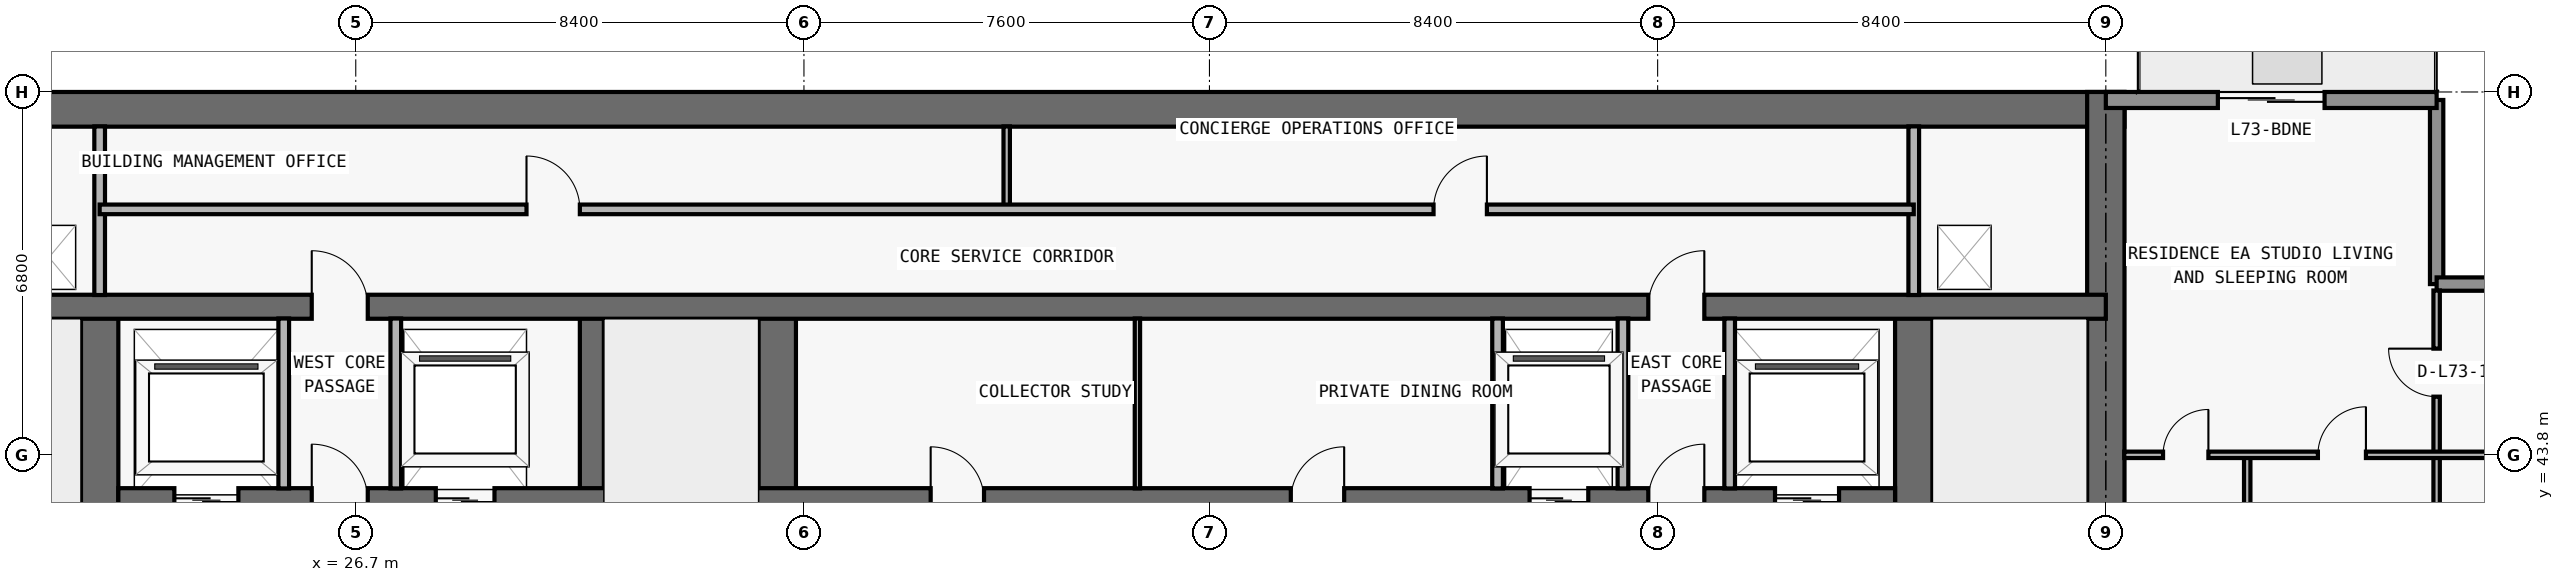
"""IFC4 building model, lengths in metres.
Left out: names, types, materials, properties, quantities, classifications, styles, units other than length and angle.
Written with IfcOpenShell. Run it as: python <this file> out.ifc"""

import sys

from ifc_helpers import new_model, si_unit, direction, frame, frame_2d, origin, place, context, subcontext, project, spatial, rectangle, extrude, element, fill, save


model = new_model("IFC4")
c1 = context("Model", 3, precision=1e-05, world=origin(), true_north=direction((0.0, 1.0)))
c2 = subcontext(c1, "Body", "Model", "MODEL_VIEW")
j1 = project(units=[si_unit("LENGTHUNIT", "METRE"), si_unit("PLANEANGLEUNIT", "RADIAN")], contexts=[c1])
p1 = place(None, origin())
s1 = spatial("IfcSite", under=j1, at=p1, CompositionType="ELEMENT")
p2 = place(p1, origin())
s2 = spatial("IfcBuilding", under=s1, at=p2, CompositionType="ELEMENT")
p3 = place(p2, frame((0.0, 0.0, 259.5)))
s3 = spatial("IfcBuildingStorey", under=s2, at=p3, CompositionType="ELEMENT", Elevation=259.5)
p4 = place(p3, frame((17.95, 50.275, 0.0), z_axis=(0.0, 0.0, 1.0), x_axis=(1.0, 0.0, 0.0)))
e1 = element("IfcWall", 1, at=p4, inside=s3, PredefinedType="SHEAR", context=c2, shape_type="SweptSolid", body=[
    extrude(rectangle(XDim=41.9, YDim=0.65, at=frame_2d((20.95, 0.0))), origin(), (0.0, 0.0, 1.0), 3.05),
])
p5 = place(p3, frame((59.5, 36.65, 0.0), z_axis=(0.0, 0.0, 1.0), x_axis=(0.0, 1.0, 0.0)))
e2 = element("IfcWall", 2, at=p5, inside=s3, PredefinedType="SHEAR", context=c2, shape_type="SweptSolid", body=[
    extrude(rectangle(XDim=13.95, YDim=0.7, at=frame_2d((6.975, 0.0))), origin(), (0.0, 0.0, 1.0), 3.05),
])
p6 = place(p3, frame((21.9, 37.0, 0.0), z_axis=(0.0, 0.0, 1.0), x_axis=(0.0, 1.0, 0.0)))
e3 = element("IfcWall", 3, at=p6, inside=s3, PredefinedType="SHEAR", context=c2, shape_type="SweptSolid", body=[
    extrude(rectangle(XDim=9.575, YDim=0.7, at=frame_2d((4.788, 0.0))), origin(), (0.0, 0.0, 1.0), 3.05),
])
p7 = place(p6, frame((0.55, 0.0, 0.0)))
e4 = element("IfcOpeningElement", 4, at=p7, cuts=e3, PredefinedType="OPENING", context=c2, shape_type="SweptSolid", body=[
    extrude(rectangle(XDim=1.1, YDim=2.15, at=frame_2d((0.55, 1.075))), frame((0.0, 0.36, 0.0), z_axis=(0.0, -1.0, 0.0), x_axis=(1.0, 0.0, 0.0)), (0.0, 0.0, 1.0), 0.72),
])
p8 = place(p3, frame((55.9, 37.0, 0.0), z_axis=(0.0, 0.0, 1.0), x_axis=(0.0, 1.0, 0.0)))
e5 = element("IfcWall", 5, at=p8, inside=s3, PredefinedType="SHEAR", context=c2, shape_type="SweptSolid", body=[
    extrude(rectangle(XDim=9.575, YDim=0.7, at=frame_2d((4.788, 0.0))), origin(), (0.0, 0.0, 1.0), 3.05),
])
p9 = place(p8, frame((0.55, 0.0, 0.0)))
e6 = element("IfcOpeningElement", 6, at=p9, cuts=e5, PredefinedType="OPENING", context=c2, shape_type="SweptSolid", body=[
    extrude(rectangle(XDim=1.1, YDim=2.15, at=frame_2d((0.55, 1.075))), frame((0.0, 0.36, 0.0), z_axis=(0.0, -1.0, 0.0), x_axis=(1.0, 0.0, 0.0)), (0.0, 0.0, 1.0), 0.72),
])
p10 = place(p3, frame((31.125, 37.0, 0.0), z_axis=(0.0, 0.0, 1.0), x_axis=(0.0, 1.0, 0.0)))
e7 = element("IfcWall", 7, at=p10, inside=s3, PredefinedType="SHEAR", context=c2, shape_type="SweptSolid", body=[
    extrude(rectangle(XDim=9.575, YDim=0.45, at=frame_2d((4.788, 0.0))), origin(), (0.0, 0.0, 1.0), 3.05),
])
p11 = place(p3, frame((34.6, 37.0, 0.0), z_axis=(0.0, 0.0, 1.0), x_axis=(0.0, 1.0, 0.0)))
e8 = element("IfcWall", 8, at=p11, inside=s3, PredefinedType="SHEAR", context=c2, shape_type="SweptSolid", body=[
    extrude(rectangle(XDim=9.575, YDim=0.7, at=frame_2d((4.788, 0.0))), origin(), (0.0, 0.0, 1.0), 3.05),
])
p12 = place(p3, frame((22.25, 42.95, 0.0), z_axis=(0.0, 0.0, 1.0), x_axis=(1.0, 0.0, 0.0)))
e9 = element("IfcWall", 9, at=p12, inside=s3, PredefinedType="SHEAR", context=c2, shape_type="SweptSolid", body=[
    extrude(rectangle(XDim=33.3, YDim=0.45, at=frame_2d((16.65, 0.0))), origin(), (0.0, 0.0, 1.0), 3.05),
])
p13 = place(p12, frame((1.05, 0.0, 0.0)))
e10 = element("IfcOpeningElement", 10, at=p13, cuts=e9, PredefinedType="OPENING", context=c2, shape_type="SweptSolid", body=[
    extrude(rectangle(XDim=1.2, YDim=2.2, at=frame_2d((0.6, 1.1))), frame((0.0, 0.235, 0.0), z_axis=(0.0, -1.0, 0.0), x_axis=(1.0, 0.0, 0.0)), (0.0, 0.0, 1.0), 0.47),
])
p14 = place(p12, frame((31.05, 0.0, 0.0)))
e11 = element("IfcOpeningElement", 11, at=p14, cuts=e9, PredefinedType="OPENING", context=c2, shape_type="SweptSolid", body=[
    extrude(rectangle(XDim=1.2, YDim=2.2, at=frame_2d((0.6, 1.1))), frame((0.0, 0.235, 0.0), z_axis=(0.0, -1.0, 0.0), x_axis=(1.0, 0.0, 0.0)), (0.0, 0.0, 1.0), 0.47),
])
p15 = place(p12, frame((26.45, 0.0, 0.0)))
e12 = element("IfcOpeningElement", 12, at=p15, cuts=e9, PredefinedType="OPENING", context=c2, shape_type="SweptSolid", body=[
    extrude(rectangle(XDim=1.1, YDim=2.2, at=frame_2d((0.55, 1.1))), frame((0.0, 0.235, 0.0), z_axis=(0.0, -1.0, 0.0), x_axis=(1.0, 0.0, 0.0)), (0.0, 0.0, 1.0), 0.47),
])
p16 = place(p12, frame((5.95, 0.0, 0.0)))
e13 = element("IfcOpeningElement", 13, at=p16, cuts=e9, PredefinedType="OPENING", context=c2, shape_type="SweptSolid", body=[
    extrude(rectangle(XDim=1.1, YDim=2.2, at=frame_2d((0.55, 1.1))), frame((0.0, 0.235, 0.0), z_axis=(0.0, -1.0, 0.0), x_axis=(1.0, 0.0, 0.0)), (0.0, 0.0, 1.0), 0.47),
])
p17 = place(p12, frame((3.625, 0.0, 0.0)))
e14 = element("IfcOpeningElement", 14, at=p17, cuts=e9, PredefinedType="OPENING", context=c2, shape_type="SweptSolid", body=[
    extrude(rectangle(XDim=1.05, YDim=2.15, at=frame_2d((0.525, 1.075))), frame((0.0, 0.235, 0.0), z_axis=(0.0, -1.0, 0.0), x_axis=(1.0, 0.0, 0.0)), (0.0, 0.0, 1.0), 0.47),
])
p18 = place(p12, frame((28.675, 0.0, 0.0)))
e15 = element("IfcOpeningElement", 15, at=p18, cuts=e9, PredefinedType="OPENING", context=c2, shape_type="SweptSolid", body=[
    extrude(rectangle(XDim=1.05, YDim=2.15, at=frame_2d((0.525, 1.075))), frame((0.0, 0.235, 0.0), z_axis=(0.0, -1.0, 0.0), x_axis=(1.0, 0.0, 0.0)), (0.0, 0.0, 1.0), 0.47),
])
p19 = place(p12, frame((15.225, 0.0, 0.0)))
e16 = element("IfcOpeningElement", 16, at=p19, cuts=e9, PredefinedType="OPENING", context=c2, shape_type="SweptSolid", body=[
    extrude(rectangle(XDim=1.0, YDim=2.2, at=frame_2d((0.5, 1.1))), frame((0.0, 0.235, 0.0), z_axis=(0.0, -1.0, 0.0), x_axis=(1.0, 0.0, 0.0)), (0.0, 0.0, 1.0), 0.47),
])
p20 = place(p12, frame((21.975, 0.0, 0.0)))
e17 = element("IfcOpeningElement", 17, at=p20, cuts=e9, PredefinedType="OPENING", context=c2, shape_type="SweptSolid", body=[
    extrude(rectangle(XDim=1.0, YDim=2.2, at=frame_2d((0.5, 1.1))), frame((0.0, 0.235, 0.0), z_axis=(0.0, -1.0, 0.0), x_axis=(1.0, 0.0, 0.0)), (0.0, 0.0, 1.0), 0.47),
])
p21 = place(p3, frame((18.3, 46.575, 0.0), z_axis=(0.0, 0.0, 1.0), x_axis=(1.0, 0.0, 0.0)))
e18 = element("IfcWall", 18, at=p21, inside=s3, PredefinedType="SHEAR", context=c2, shape_type="SweptSolid", body=[
    extrude(rectangle(XDim=41.2, YDim=0.45, at=frame_2d((20.6, 0.0))), origin(), (0.0, 0.0, 1.0), 3.05),
])
p22 = place(p21, frame((7.575, 0.0, 0.0)))
e19 = element("IfcOpeningElement", 19, at=p22, cuts=e18, PredefinedType="OPENING", context=c2, shape_type="SweptSolid", body=[
    extrude(rectangle(XDim=1.05, YDim=2.15, at=frame_2d((0.525, 1.075))), frame((0.0, 0.235, 0.0), z_axis=(0.0, -1.0, 0.0), x_axis=(1.0, 0.0, 0.0)), (0.0, 0.0, 1.0), 0.47),
])
p23 = place(p21, frame((32.625, 0.0, 0.0)))
e20 = element("IfcOpeningElement", 20, at=p23, cuts=e18, PredefinedType="OPENING", context=c2, shape_type="SweptSolid", body=[
    extrude(rectangle(XDim=1.05, YDim=2.15, at=frame_2d((0.525, 1.075))), frame((0.0, 0.235, 0.0), z_axis=(0.0, -1.0, 0.0), x_axis=(1.0, 0.0, 0.0)), (0.0, 0.0, 1.0), 0.47),
])
p24 = place(p3, frame((65.7, 50.45, 0.0), z_axis=(0.0, 0.0, 1.0), x_axis=(0.0, -1.0, 0.0)))
e21 = element("IfcWall", 21, at=p24, inside=s3, PredefinedType="ELEMENTEDWALL", context=c2, shape_type="SweptSolid", body=[
    extrude(rectangle(XDim=3.45, YDim=0.25, at=frame_2d((1.725, 0.0))), origin(), (0.0, 0.0, 1.0), 3.05),
])
p25 = place(p3, frame((65.7, 47.0, 0.0), z_axis=(0.0, 0.0, 1.0), x_axis=(1.0, 0.0, 0.0)))
e22 = element("IfcWall", 22, at=p25, inside=s3, PredefinedType="ELEMENTEDWALL", context=c2, shape_type="SweptSolid", body=[
    extrude(rectangle(XDim=3.85, YDim=0.25, at=frame_2d((1.925, 0.0))), origin(), (0.0, 0.0, 1.0), 3.05),
])
p26 = place(p3, frame((59.5, 50.45, 0.0), z_axis=(0.0, 0.0, 1.0), x_axis=(1.0, 0.0, 0.0)))
e23 = element("IfcWall", 23, at=p26, inside=s3, PredefinedType="STANDARD", context=c2, shape_type="SweptSolid", body=[
    extrude(rectangle(XDim=6.2, YDim=0.3, at=frame_2d((3.1, 0.0))), origin(), (0.0, 0.0, 1.0), 3.05),
])
p27 = place(p26, frame((2.1, 0.0, 0.0)))
e24 = element("IfcOpeningElement", 24, at=p27, cuts=e23, PredefinedType="OPENING", context=c2, shape_type="SweptSolid", body=[
    extrude(rectangle(XDim=2.0, YDim=2.3, at=frame_2d((1.0, 1.15))), frame((0.0, 0.16, 0.0), z_axis=(0.0, -1.0, 0.0), x_axis=(1.0, 0.0, 0.0)), (0.0, 0.0, 1.0), 0.32),
])
p28 = place(p3, frame((21.9, 46.795, 0.0), z_axis=(0.0, 0.0, 1.0), x_axis=(0.0, 1.0, 0.0)))
e25 = element("IfcWall", 25, at=p28, inside=s3, PredefinedType="PARTITIONING", context=c2, shape_type="SweptSolid", body=[
    extrude(rectangle(XDim=3.16, YDim=0.2, at=frame_2d((1.58, 0.0))), origin(), (0.0, 0.0, 1.0), 3.05),
])
for number, where, z_axis, x_axis in (
    (26, (25.35, 43.17, 0.0), (0.0, 0.0, 1.0), (0.0, 1.0, 0.0)),
    (27, (27.45, 43.17, 0.0), (0.0, 0.0, 1.0), (0.0, 1.0, 0.0)),
):
    element("IfcWall", number, at=place(p3, frame(where, z_axis=z_axis, x_axis=x_axis)), inside=s3, PredefinedType="PARTITIONING", context=c2, shape_type="SweptSolid", body=[
        extrude(rectangle(XDim=3.185, YDim=0.2, at=frame_2d((1.593, 0.0))), origin(), (0.0, 0.0, 1.0), 3.05),
    ])
p29 = place(p3, frame((38.9, 48.4, 0.0), z_axis=(0.0, 0.0, 1.0), x_axis=(0.0, 1.0, 0.0)))
e28 = element("IfcWall", 28, at=p29, inside=s3, PredefinedType="PARTITIONING", context=c2, shape_type="SweptSolid", body=[
    extrude(rectangle(XDim=1.555, YDim=0.12, at=frame_2d((0.778, 0.0))), origin(), (0.0, 0.0, 1.0), 3.05),
])
p30 = place(p3, frame((41.35, 43.17, 0.0), z_axis=(0.0, 0.0, 1.0), x_axis=(0.0, 1.0, 0.0)))
e29 = element("IfcWall", 29, at=p30, inside=s3, PredefinedType="MOVABLE", context=c2, shape_type="SweptSolid", body=[
    extrude(rectangle(XDim=3.185, YDim=0.1, at=frame_2d((1.593, 0.0))), origin(), (0.0, 0.0, 1.0), 3.05),
])
for number, where, z_axis, x_axis in (
    (30, (48.1, 43.17, 0.0), (0.0, 0.0, 1.0), (0.0, 1.0, 0.0)),
    (31, (50.45, 43.17, 0.0), (0.0, 0.0, 1.0), (0.0, 1.0, 0.0)),
    (32, (52.45, 43.17, 0.0), (0.0, 0.0, 1.0), (0.0, 1.0, 0.0)),
):
    element("IfcWall", number, at=place(p3, frame(where, z_axis=z_axis, x_axis=x_axis)), inside=s3, PredefinedType="PARTITIONING", context=c2, shape_type="SweptSolid", body=[
        extrude(rectangle(XDim=3.185, YDim=0.2, at=frame_2d((1.593, 0.0))), origin(), (0.0, 0.0, 1.0), 3.05),
    ])
p31 = place(p3, frame((55.9, 46.795, 0.0), z_axis=(0.0, 0.0, 1.0), x_axis=(0.0, 1.0, 0.0)))
e33 = element("IfcWall", 33, at=p31, inside=s3, PredefinedType="PARTITIONING", context=c2, shape_type="SweptSolid", body=[
    extrude(rectangle(XDim=3.16, YDim=0.2, at=frame_2d((1.58, 0.0))), origin(), (0.0, 0.0, 1.0), 3.05),
])
p32 = place(p3, frame((62.15, 37.0, 0.0), z_axis=(0.0, 0.0, 1.0), x_axis=(0.0, 1.0, 0.0)))
e34 = element("IfcWall", 34, at=p32, inside=s3, PredefinedType="PARTITIONING", context=c2, shape_type="SweptSolid", body=[
    extrude(rectangle(XDim=6.8, YDim=0.12, at=frame_2d((3.4, 0.0))), origin(), (0.0, 0.0, 1.0), 3.05),
])
p33 = place(p32, frame((1.207, 0.0, 0.0)))
e35 = element("IfcOpeningElement", 35, at=p33, cuts=e34, PredefinedType="OPENING", context=c2, shape_type="SweptSolid", body=[
    extrude(rectangle(XDim=0.85, YDim=2.1, at=frame_2d((0.425, 1.05))), frame((0.0, 0.07, 0.0), z_axis=(0.0, -1.0, 0.0), x_axis=(1.0, 0.0, 0.0)), (0.0, 0.0, 1.0), 0.14),
])
p34 = place(p3, frame((65.7, 37.005, 0.0), z_axis=(0.0, 0.0, 1.0), x_axis=(0.0, 1.0, 0.0)))
e36 = element("IfcWall", 36, at=p34, inside=s3, PredefinedType="PARTITIONING", context=c2, shape_type="SweptSolid", body=[
    extrude(rectangle(XDim=9.875, YDim=0.12, at=frame_2d((4.938, 0.0))), origin(), (0.0, 0.0, 1.0), 2.629),
])
p35 = place(p34, frame((2.948, 0.0, 0.0)))
e37 = element("IfcOpeningElement", 37, at=p35, cuts=e36, PredefinedType="OPENING", context=c2, shape_type="SweptSolid", body=[
    extrude(rectangle(XDim=0.9, YDim=2.15, at=frame_2d((0.45, 1.075))), frame((0.0, 0.07, 0.0), z_axis=(0.0, -1.0, 0.0), x_axis=(1.0, 0.0, 0.0)), (0.0, 0.0, 1.0), 0.14),
])
p36 = place(p34, frame((7.885, 0.0, 0.0)))
e38 = element("IfcOpeningElement", 38, at=p36, cuts=e36, PredefinedType="OPENING", context=c2, shape_type="SweptSolid", body=[
    extrude(rectangle(XDim=0.9, YDim=2.15, at=frame_2d((0.45, 1.075))), frame((0.0, 0.07, 0.0), z_axis=(0.0, -1.0, 0.0), x_axis=(1.0, 0.0, 0.0)), (0.0, 0.0, 1.0), 0.14),
])
p37 = place(p3, frame((59.845, 43.8, 0.0), z_axis=(0.0, 0.0, 1.0), x_axis=(1.0, 0.0, 0.0)))
e39 = element("IfcWall", 39, at=p37, inside=s3, PredefinedType="PARTITIONING", context=c2, shape_type="SweptSolid", body=[
    extrude(rectangle(XDim=9.56, YDim=0.12, at=frame_2d((4.78, 0.0))), origin(), (0.0, 0.0, 1.0), 2.418),
])
p38 = place(p37, frame((3.63, 0.0, 0.0)))
e40 = element("IfcOpeningElement", 40, at=p38, cuts=e39, PredefinedType="OPENING", context=c2, shape_type="SweptSolid", body=[
    extrude(rectangle(XDim=0.9, YDim=2.15, at=frame_2d((0.45, 1.075))), frame((0.0, 0.07, 0.0), z_axis=(0.0, -1.0, 0.0), x_axis=(1.0, 0.0, 0.0)), (0.0, 0.0, 1.0), 0.14),
])
p39 = place(p37, frame((0.728, 0.0, 0.0)))
e41 = element("IfcOpeningElement", 41, at=p39, cuts=e39, PredefinedType="OPENING", context=c2, shape_type="SweptSolid", body=[
    extrude(rectangle(XDim=0.85, YDim=2.1, at=frame_2d((0.425, 1.05))), frame((0.0, 0.07, 0.0), z_axis=(0.0, -1.0, 0.0), x_axis=(1.0, 0.0, 0.0)), (0.0, 0.0, 1.0), 0.14),
])
p40 = place(p3, frame((21.9, 48.4, 0.0), z_axis=(0.0, 0.0, 1.0), x_axis=(1.0, 0.0, 0.0)))
e42 = element("IfcWall", 42, at=p40, inside=s3, PredefinedType="PARTITIONING", context=c2, shape_type="SweptSolid", body=[
    extrude(rectangle(XDim=34.0, YDim=0.18, at=frame_2d((17.0, 0.0))), origin(), (0.0, 0.0, 1.0), 3.05),
])
p41 = place(p40, frame((8.0, 0.0, 0.0)))
e43 = element("IfcOpeningElement", 43, at=p41, cuts=e42, PredefinedType="OPENING", context=c2, shape_type="SweptSolid", body=[
    extrude(rectangle(XDim=1.0, YDim=2.2, at=frame_2d((0.5, 1.1))), frame((0.0, 0.1, 0.0), z_axis=(0.0, -1.0, 0.0), x_axis=(1.0, 0.0, 0.0)), (0.0, 0.0, 1.0), 0.2),
])
p42 = place(p40, frame((25.0, 0.0, 0.0)))
e44 = element("IfcOpeningElement", 44, at=p42, cuts=e42, PredefinedType="OPENING", context=c2, shape_type="SweptSolid", body=[
    extrude(rectangle(XDim=1.0, YDim=2.2, at=frame_2d((0.5, 1.1))), frame((0.0, 0.1, 0.0), z_axis=(0.0, -1.0, 0.0), x_axis=(1.0, 0.0, 0.0)), (0.0, 0.0, 1.0), 0.2),
])
p43 = place(p27, origin())
e45 = element("IfcDoor", 45, at=p43, inside=s3, OperationType="DOUBLE_DOOR_SLIDING", PredefinedType="DOOR", context=c2, shape_type="SweptSolid", body=[
    extrude(rectangle(XDim=2.0, YDim=2.3, at=frame_2d((1.0, 1.15))), frame((0.0, 0.025, 0.0), z_axis=(0.0, -1.0, 0.0), x_axis=(1.0, 0.0, 0.0)), (0.0, 0.0, 1.0), 0.05),
])
fill(e24, e45)
p44 = place(p13, origin())
e46 = element("IfcDoor", 46, at=p44, inside=s3, OperationType="DOUBLE_DOOR_SLIDING", PredefinedType="DOOR", context=c2, shape_type="SweptSolid", body=[
    extrude(rectangle(XDim=1.2, YDim=2.2, at=frame_2d((0.6, 1.1))), frame((0.0, 0.025, 0.0), z_axis=(0.0, -1.0, 0.0), x_axis=(1.0, 0.0, 0.0)), (0.0, 0.0, 1.0), 0.05),
])
fill(e10, e46)
p45 = place(p14, origin())
e47 = element("IfcDoor", 47, at=p45, inside=s3, OperationType="DOUBLE_DOOR_SLIDING", PredefinedType="DOOR", context=c2, shape_type="SweptSolid", body=[
    extrude(rectangle(XDim=1.2, YDim=2.2, at=frame_2d((0.6, 1.1))), frame((0.0, 0.025, 0.0), z_axis=(0.0, -1.0, 0.0), x_axis=(1.0, 0.0, 0.0)), (0.0, 0.0, 1.0), 0.05),
])
fill(e11, e47)
p46 = place(p15, origin())
e48 = element("IfcDoor", 48, at=p46, inside=s3, OperationType="DOUBLE_DOOR_SLIDING", PredefinedType="DOOR", context=c2, shape_type="SweptSolid", body=[
    extrude(rectangle(XDim=1.1, YDim=2.2, at=frame_2d((0.55, 1.1))), frame((0.0, 0.025, 0.0), z_axis=(0.0, -1.0, 0.0), x_axis=(1.0, 0.0, 0.0)), (0.0, 0.0, 1.0), 0.05),
])
fill(e12, e48)
p47 = place(p16, origin())
e49 = element("IfcDoor", 49, at=p47, inside=s3, OperationType="DOUBLE_DOOR_SLIDING", PredefinedType="DOOR", context=c2, shape_type="SweptSolid", body=[
    extrude(rectangle(XDim=1.1, YDim=2.2, at=frame_2d((0.55, 1.1))), frame((0.0, 0.025, 0.0), z_axis=(0.0, -1.0, 0.0), x_axis=(1.0, 0.0, 0.0)), (0.0, 0.0, 1.0), 0.05),
])
fill(e13, e49)
p48 = place(p17, origin())
e50 = element("IfcDoor", 50, at=p48, inside=s3, OperationType="SINGLE_SWING_LEFT", PredefinedType="DOOR", context=c2, shape_type="SweptSolid", body=[
    extrude(rectangle(XDim=1.05, YDim=2.15, at=frame_2d((0.525, 1.075))), frame((0.0, 0.025, 0.0), z_axis=(0.0, -1.0, 0.0), x_axis=(1.0, 0.0, 0.0)), (0.0, 0.0, 1.0), 0.05),
])
fill(e14, e50)
p49 = place(p18, origin())
e51 = element("IfcDoor", 51, at=p49, inside=s3, OperationType="SINGLE_SWING_RIGHT", PredefinedType="DOOR", context=c2, shape_type="SweptSolid", body=[
    extrude(rectangle(XDim=1.05, YDim=2.15, at=frame_2d((0.525, 1.075))), frame((0.0, 0.025, 0.0), z_axis=(0.0, -1.0, 0.0), x_axis=(1.0, 0.0, 0.0)), (0.0, 0.0, 1.0), 0.05),
])
fill(e15, e51)
p50 = place(p19, origin())
e52 = element("IfcDoor", 52, at=p50, inside=s3, OperationType="SINGLE_SWING_LEFT", PredefinedType="DOOR", context=c2, shape_type="SweptSolid", body=[
    extrude(rectangle(XDim=1.0, YDim=2.2, at=frame_2d((0.5, 1.1))), frame((0.0, 0.025, 0.0), z_axis=(0.0, -1.0, 0.0), x_axis=(1.0, 0.0, 0.0)), (0.0, 0.0, 1.0), 0.05),
])
fill(e16, e52)
p51 = place(p20, origin())
e53 = element("IfcDoor", 53, at=p51, inside=s3, OperationType="SINGLE_SWING_RIGHT", PredefinedType="DOOR", context=c2, shape_type="SweptSolid", body=[
    extrude(rectangle(XDim=1.0, YDim=2.2, at=frame_2d((0.5, 1.1))), frame((0.0, 0.025, 0.0), z_axis=(0.0, -1.0, 0.0), x_axis=(1.0, 0.0, 0.0)), (0.0, 0.0, 1.0), 0.05),
])
fill(e17, e53)
p52 = place(p22, origin())
e54 = element("IfcDoor", 54, at=p52, inside=s3, OperationType="SINGLE_SWING_LEFT", PredefinedType="DOOR", context=c2, shape_type="SweptSolid", body=[
    extrude(rectangle(XDim=1.05, YDim=2.15, at=frame_2d((0.525, 1.075))), frame((0.0, 0.025, 0.0), z_axis=(0.0, -1.0, 0.0), x_axis=(1.0, 0.0, 0.0)), (0.0, 0.0, 1.0), 0.05),
])
fill(e19, e54)
p53 = place(p23, origin())
e55 = element("IfcDoor", 55, at=p53, inside=s3, OperationType="SINGLE_SWING_RIGHT", PredefinedType="DOOR", context=c2, shape_type="SweptSolid", body=[
    extrude(rectangle(XDim=1.05, YDim=2.15, at=frame_2d((0.525, 1.075))), frame((0.0, 0.025, 0.0), z_axis=(0.0, -1.0, 0.0), x_axis=(1.0, 0.0, 0.0)), (0.0, 0.0, 1.0), 0.05),
])
fill(e20, e55)
p54 = place(p41, origin())
e56 = element("IfcDoor", 56, at=p54, inside=s3, OperationType="SINGLE_SWING_LEFT", PredefinedType="DOOR", context=c2, shape_type="SweptSolid", body=[
    extrude(rectangle(XDim=1.0, YDim=2.2, at=frame_2d((0.5, 1.1))), frame((0.0, 0.025, 0.0), z_axis=(0.0, -1.0, 0.0), x_axis=(1.0, 0.0, 0.0)), (0.0, 0.0, 1.0), 0.05),
])
fill(e43, e56)
p55 = place(p42, origin())
e57 = element("IfcDoor", 57, at=p55, inside=s3, OperationType="SINGLE_SWING_RIGHT", PredefinedType="DOOR", context=c2, shape_type="SweptSolid", body=[
    extrude(rectangle(XDim=1.0, YDim=2.2, at=frame_2d((0.5, 1.1))), frame((0.0, 0.025, 0.0), z_axis=(0.0, -1.0, 0.0), x_axis=(1.0, 0.0, 0.0)), (0.0, 0.0, 1.0), 0.05),
])
fill(e44, e57)
p56 = place(p38, origin())
e58 = element("IfcDoor", 58, at=p56, inside=s3, OperationType="SINGLE_SWING_RIGHT", PredefinedType="DOOR", context=c2, shape_type="SweptSolid", body=[
    extrude(rectangle(XDim=0.9, YDim=2.15, at=frame_2d((0.45, 1.075))), frame((0.0, 0.025, 0.0), z_axis=(0.0, -1.0, 0.0), x_axis=(1.0, 0.0, 0.0)), (0.0, 0.0, 1.0), 0.05),
])
fill(e40, e58)
p57 = place(p39, origin())
e59 = element("IfcDoor", 59, at=p57, inside=s3, OperationType="SINGLE_SWING_RIGHT", PredefinedType="DOOR", context=c2, shape_type="SweptSolid", body=[
    extrude(rectangle(XDim=0.85, YDim=2.1, at=frame_2d((0.425, 1.05))), frame((0.0, 0.025, 0.0), z_axis=(0.0, -1.0, 0.0), x_axis=(1.0, 0.0, 0.0)), (0.0, 0.0, 1.0), 0.05),
])
fill(e41, e59)
p58 = place(p36, origin())
e60 = element("IfcDoor", 60, at=p58, inside=s3, OperationType="SINGLE_SWING_RIGHT", PredefinedType="DOOR", context=c2, shape_type="SweptSolid", body=[
    extrude(rectangle(XDim=0.9, YDim=2.15, at=frame_2d((0.45, 1.075))), frame((0.0, 0.025, 0.0), z_axis=(0.0, -1.0, 0.0), x_axis=(1.0, 0.0, 0.0)), (0.0, 0.0, 1.0), 0.05),
])
fill(e38, e60)
save(model, sys.argv[1])
